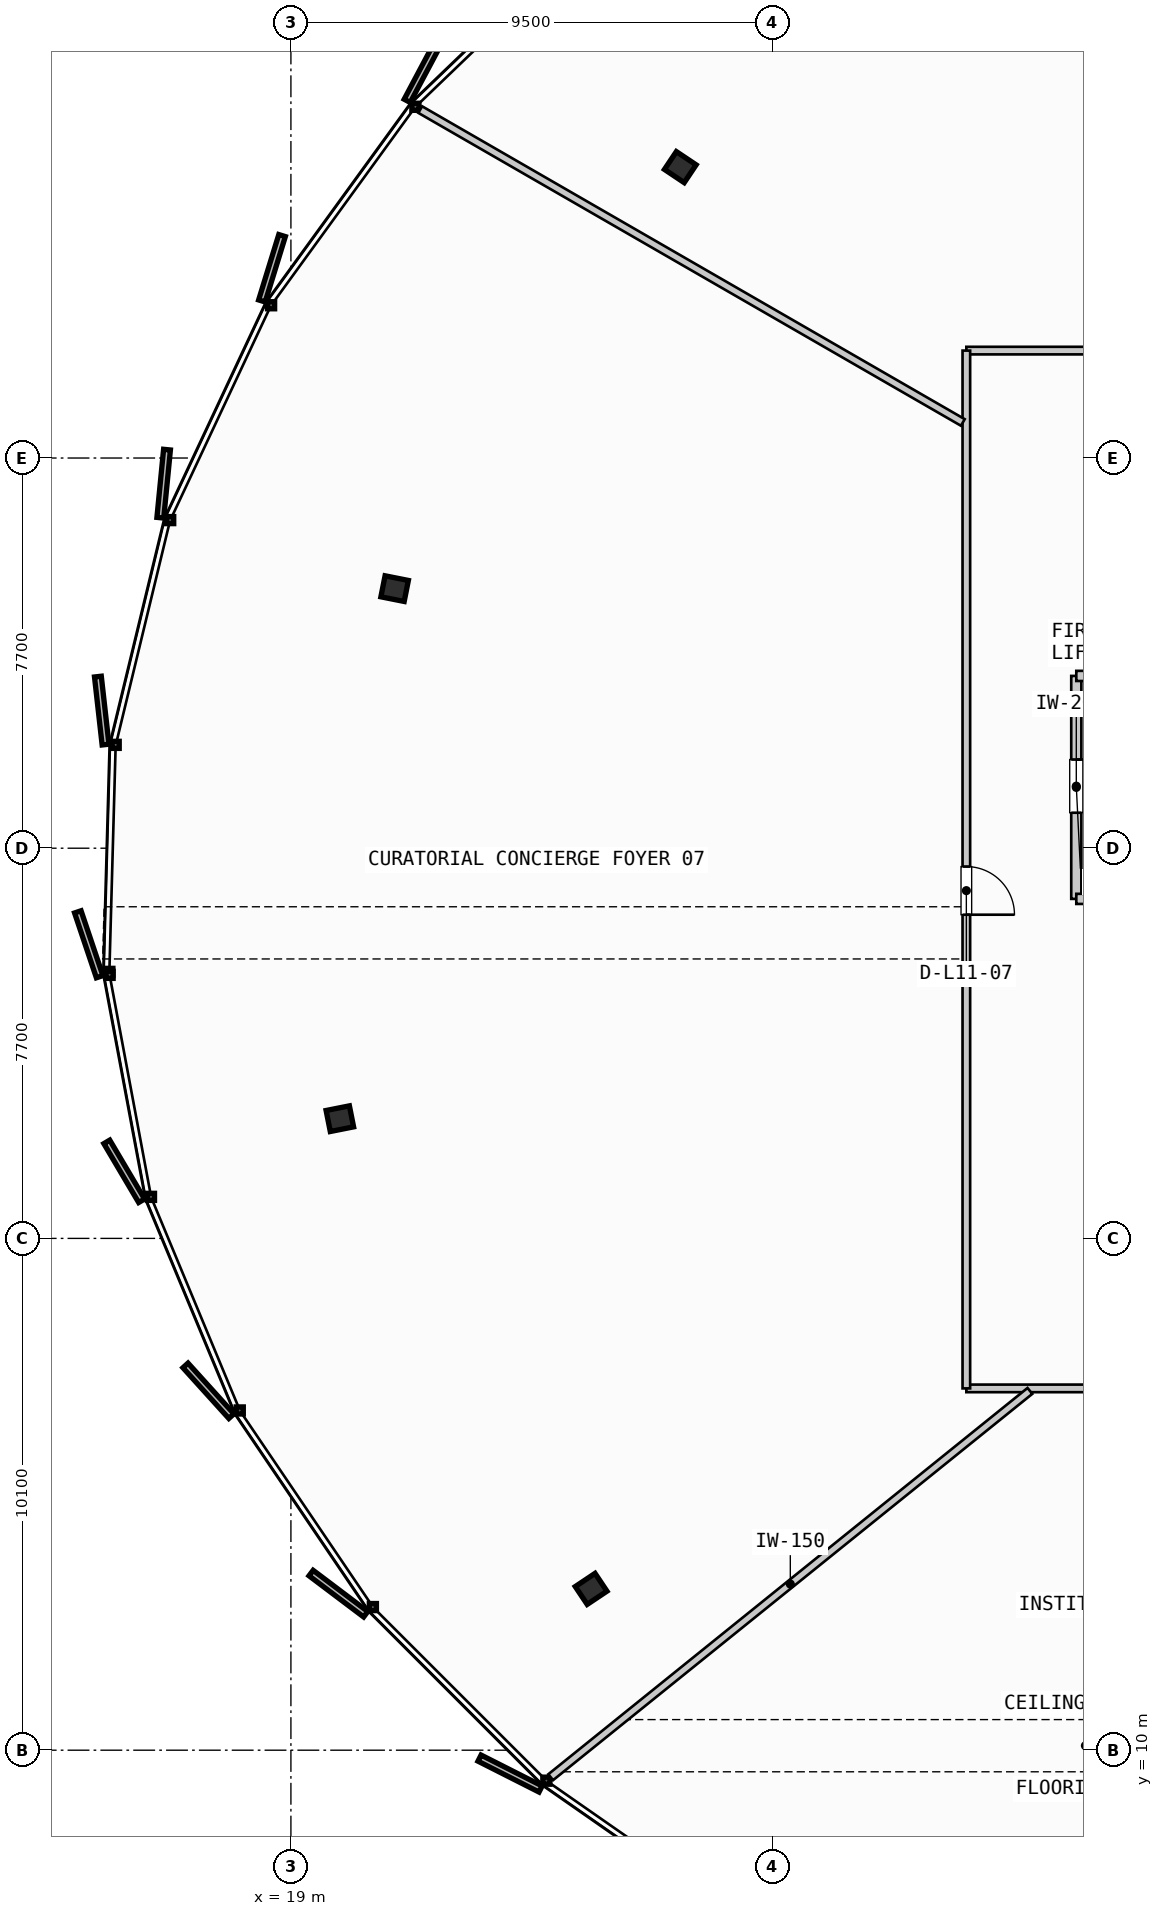
"""IFC4 building model, lengths in metres.
Left out: names, types, materials, properties, quantities, classifications, styles, units other than length and angle.
Written with IfcOpenShell. Run it as: python <this file> out.ifc"""

import sys

from ifc_helpers import new_model, si_unit, direction, frame, frame_2d, origin, origin_2d, place, context, subcontext, project, spatial, rectangle, i_section, extrude, source, transform, mapped, element, fill, save


model = new_model("IFC4")
c1 = context("Model", 3, precision=1e-05, world=origin(), true_north=direction((0.0, 1.0)))
c2 = subcontext(c1, "Body", "Model", "MODEL_VIEW")
j1 = project(units=[si_unit("LENGTHUNIT", "METRE"), si_unit("PLANEANGLEUNIT", "RADIAN")], contexts=[c1])
p1 = place(None, origin())
s1 = spatial("IfcSite", under=j1, at=p1, CompositionType="ELEMENT")
p2 = place(p1, origin())
s2 = spatial("IfcBuilding", under=s1, at=p2, CompositionType="ELEMENT")
p3 = place(p2, frame((0.0, 0.0, 48.6)))
s3 = spatial("IfcBuildingStorey", under=s2, at=p3, CompositionType="ELEMENT", Elevation=48.6)
m1 = source(origin(), c2, "Body", "SweptSolid", [
    extrude(i_section(OverallWidth=0.423, OverallDepth=0.469, WebThickness=0.051, FlangeThickness=0.081, FilletRadius=0.015, at=origin_2d()), origin(), (0.0, 0.0, 1.0), 3.55),
])
for number, where, z_axis, x_axis in (
    (1, (26.685, 41.241, 0.0), (0.0, 0.0, 1.0), (-0.831, 0.556, 0.0)),
    (2, (21.047, 32.923, 0.0), (0.0, 0.0, 1.0), (-0.981, 0.195, 0.0)),
    (3, (19.966, 22.462, 0.0), (0.0, 0.0, 1.0), (-0.981, -0.195, 0.0)),
    (4, (24.925, 13.183, 0.0), (0.0, 0.0, 1.0), (-0.831, -0.556, 0.0)),
):
    element("IfcColumn", number, at=place(p3, frame(where, z_axis=z_axis, x_axis=x_axis)), inside=s3, PredefinedType="COLUMN", context=c2, shape_type="MappedRepresentation", body=[
        mapped(m1, transform((0.0, 0.0, 0.0), scale=1.0)),
    ])
p4 = place(p3, frame((34.5, 31.2, 0.0), z_axis=(0.0, 0.0, 1.0), x_axis=(0.0, -1.0, 0.0)))
e5 = element("IfcWall", 5, at=p4, inside=s3, PredefinedType="PARTITIONING", context=c2, shape_type="SweptSolid", body=[
    extrude(rectangle(XDim=4.4, YDim=0.2, at=frame_2d((2.2, 0.0))), origin(), (0.0, 0.0, 1.0), 2.785),
])
p5 = place(p4, frame((1.65, 0.0, 0.0)))
e6 = element("IfcOpeningElement", 6, at=p5, cuts=e5, PredefinedType="OPENING", context=c2, shape_type="SweptSolid", body=[
    extrude(rectangle(XDim=1.05, YDim=2.15, at=frame_2d((0.525, 1.075))), frame((0.0, 0.11, 0.0), z_axis=(0.0, -1.0, 0.0), x_axis=(1.0, 0.0, 0.0)), (0.0, 0.0, 1.0), 0.22),
])
for number, where, z_axis, x_axis in (
    (7, (34.5, 26.8, 0.0), (0.0, 0.0, 1.0), (1.0, 0.0, 0.0)),
    (8, (34.5, 31.2, 0.0), (0.0, 0.0, 1.0), (1.0, 0.0, 0.0)),
):
    element("IfcWall", number, at=place(p3, frame(where, z_axis=z_axis, x_axis=x_axis)), inside=s3, PredefinedType="PARTITIONING", context=c2, shape_type="SweptSolid", body=[
        extrude(rectangle(XDim=3.14, YDim=0.2, at=frame_2d((1.57, 0.0))), origin(), (0.0, 0.0, 1.0), 2.785),
    ])
p6 = place(p3, frame((32.33, 17.14, 0.0), z_axis=(0.0, 0.0, 1.0), x_axis=(1.0, 0.0, 0.0)))
e9 = element("IfcWall", 9, at=p6, inside=s3, PredefinedType="PARTITIONING", context=c2, shape_type="SweptSolid", body=[
    extrude(rectangle(XDim=30.5, YDim=0.15, at=frame_2d((15.25, 0.0))), origin(), (0.0, 0.0, 1.0), 2.785),
])
p7 = place(p6, frame((6.621, 0.0, 0.0)))
e10 = element("IfcOpeningElement", 10, at=p7, cuts=e9, PredefinedType="OPENING", context=c2, shape_type="SweptSolid", body=[
    extrude(rectangle(XDim=0.95, YDim=2.15, at=frame_2d((0.475, 1.075))), frame((0.0, 0.085, 0.0), z_axis=(0.0, -1.0, 0.0), x_axis=(1.0, 0.0, 0.0)), (0.0, 0.0, 1.0), 0.17),
])
p8 = place(p6, frame((21.004, 0.0, 0.0)))
e11 = element("IfcOpeningElement", 11, at=p8, cuts=e9, PredefinedType="OPENING", context=c2, shape_type="SweptSolid", body=[
    extrude(rectangle(XDim=0.95, YDim=2.15, at=frame_2d((0.475, 1.075))), frame((0.0, 0.085, 0.0), z_axis=(0.0, -1.0, 0.0), x_axis=(1.0, 0.0, 0.0)), (0.0, 0.0, 1.0), 0.17),
])
p9 = place(p3, frame((62.83, 37.62, 0.0), z_axis=(0.0, 0.0, 1.0), x_axis=(-1.0, 0.0, 0.0)))
e12 = element("IfcWall", 12, at=p9, inside=s3, PredefinedType="PARTITIONING", context=c2, shape_type="SweptSolid", body=[
    extrude(rectangle(XDim=30.5, YDim=0.15, at=frame_2d((15.25, 0.0))), origin(), (0.0, 0.0, 1.0), 2.785),
])
p10 = place(p9, frame((7.167, 0.0, 0.0)))
e13 = element("IfcOpeningElement", 13, at=p10, cuts=e12, PredefinedType="OPENING", context=c2, shape_type="SweptSolid", body=[
    extrude(rectangle(XDim=0.95, YDim=2.15, at=frame_2d((0.475, 1.075))), frame((0.0, 0.085, 0.0), z_axis=(0.0, -1.0, 0.0), x_axis=(1.0, 0.0, 0.0)), (0.0, 0.0, 1.0), 0.17),
])
p11 = place(p9, frame((21.836, 0.0, 0.0)))
e14 = element("IfcOpeningElement", 14, at=p11, cuts=e12, PredefinedType="OPENING", context=c2, shape_type="SweptSolid", body=[
    extrude(rectangle(XDim=0.95, YDim=2.15, at=frame_2d((0.475, 1.075))), frame((0.0, 0.085, 0.0), z_axis=(0.0, -1.0, 0.0), x_axis=(1.0, 0.0, 0.0)), (0.0, 0.0, 1.0), 0.17),
])
p12 = place(p3, frame((32.33, 37.62, 0.0), z_axis=(0.0, 0.0, 1.0), x_axis=(0.0, -1.0, 0.0)))
e15 = element("IfcWall", 15, at=p12, inside=s3, PredefinedType="PARTITIONING", context=c2, shape_type="SweptSolid", body=[
    extrude(rectangle(XDim=20.48, YDim=0.15, at=frame_2d((10.24, 0.0))), origin(), (0.0, 0.0, 1.0), 2.785),
])
p13 = place(p12, frame((10.182, 0.0, 0.0)))
e16 = element("IfcOpeningElement", 16, at=p13, cuts=e15, PredefinedType="OPENING", context=c2, shape_type="SweptSolid", body=[
    extrude(rectangle(XDim=0.95, YDim=2.15, at=frame_2d((0.475, 1.075))), frame((0.0, 0.085, 0.0), z_axis=(0.0, -1.0, 0.0), x_axis=(1.0, 0.0, 0.0)), (0.0, 0.0, 1.0), 0.17),
])
p14 = place(p3, frame((33.585, 17.09, 0.0), z_axis=(0.0, 0.0, 1.0), x_axis=(-0.778592960222, -0.627529284012, 0.0)))
e17 = element("IfcWall", 17, at=p14, inside=s3, PredefinedType="PARTITIONING", context=c2, shape_type="SweptSolid", body=[
    extrude(rectangle(XDim=12.147, YDim=0.15, at=frame_2d((6.073, 0.0))), origin(), (0.0, 0.0, 1.0), 2.785),
])
p15 = place(p3, frame((32.261, 36.202, 0.0), z_axis=(0.0, 0.0, 1.0), x_axis=(-0.866322342506, 0.499485333994, 0.0)))
e18 = element("IfcWall", 18, at=p15, inside=s3, PredefinedType="PARTITIONING", context=c2, shape_type="SweptSolid", body=[
    extrude(rectangle(XDim=12.361, YDim=0.15, at=frame_2d((6.18, 0.0))), origin(), (0.0, 0.0, 1.0), 2.785),
])
m2 = source(origin(), c2, "Body", "SweptSolid", [
    extrude(rectangle(XDim=1.05, YDim=2.15, at=frame_2d((0.525, 1.075))), frame((0.0, 0.025, 0.0), z_axis=(0.0, -1.0, 0.0), x_axis=(1.0, 0.0, 0.0)), (0.0, 0.0, 1.0), 0.05),
])
p16 = place(p5, origin())
e19 = element("IfcDoor", 19, at=p16, inside=s3, OperationType="SINGLE_SWING_LEFT", PredefinedType="DOOR", context=c2, shape_type="MappedRepresentation", body=[
    mapped(m2, transform((0.0, 0.0, 0.0), scale=1.0)),
])
fill(e6, e19)
m3 = source(origin(), c2, "Body", "SweptSolid", [
    extrude(rectangle(XDim=0.95, YDim=2.15, at=frame_2d((0.475, 1.075))), frame((0.0, 0.025, 0.0), z_axis=(0.0, -1.0, 0.0), x_axis=(1.0, 0.0, 0.0)), (0.0, 0.0, 1.0), 0.05),
])
p17 = place(p13, origin())
e20 = element("IfcDoor", 20, at=p17, inside=s3, OperationType="SINGLE_SWING_RIGHT", PredefinedType="DOOR", context=c2, shape_type="MappedRepresentation", body=[
    mapped(m3, transform((0.0, 0.0, 0.0), scale=1.0)),
])
fill(e16, e20)
save(model, sys.argv[1])
